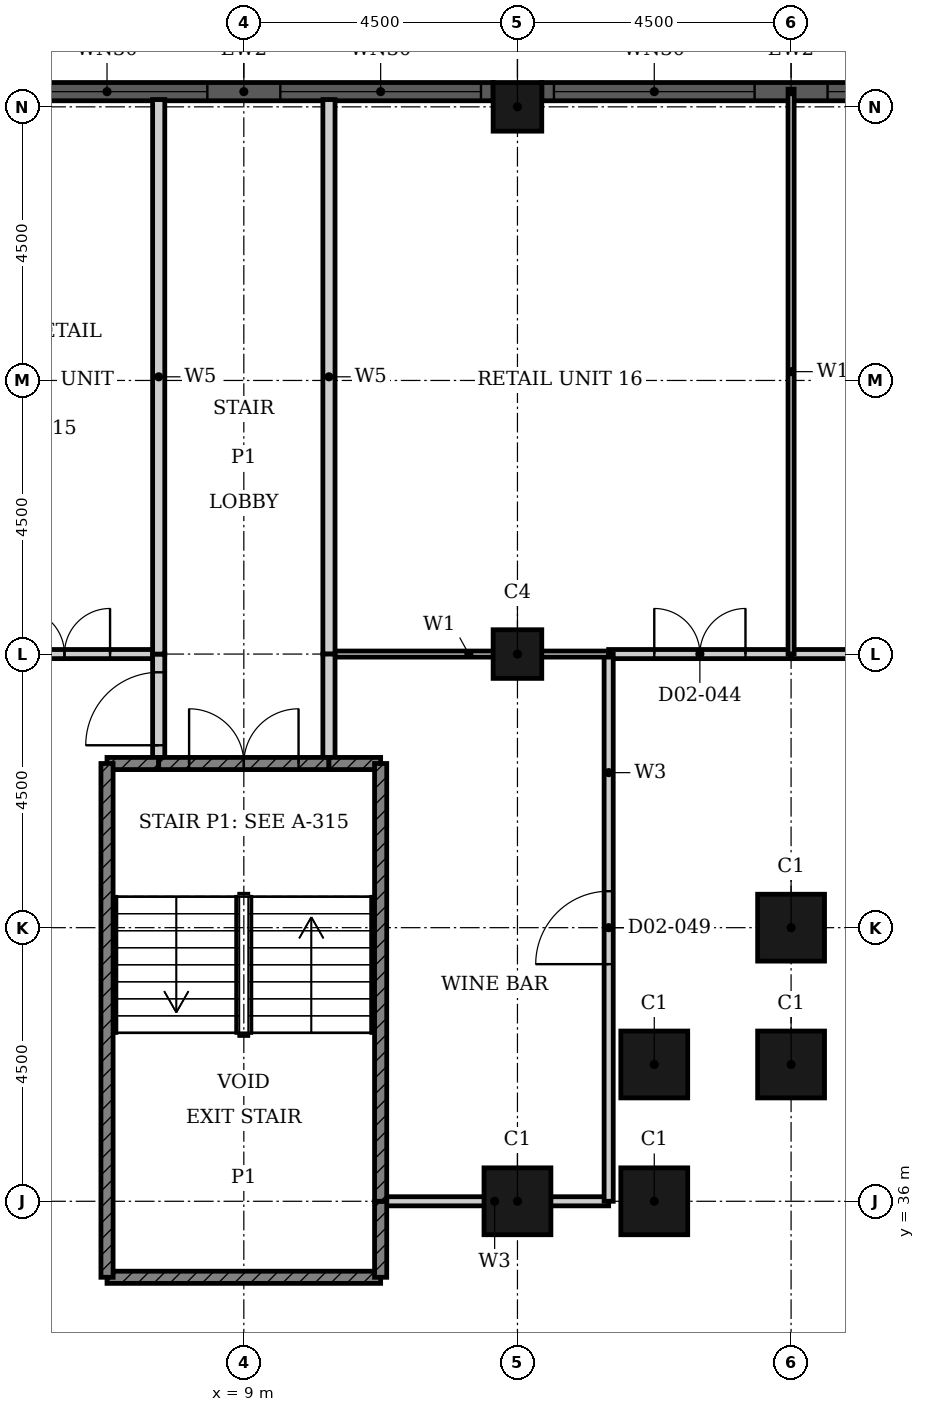
"""IFC4 building model, lengths in metres.
Left out: names, types, materials, properties, quantities, classifications, styles, units other than length and angle.
Written with IfcOpenShell. Run it as: python <this file> out.ifc"""

import sys

from ifc_helpers import new_model, si_unit, direction, frame, frame_2d, origin, origin_2d, place, context, subcontext, project, spatial, rectangle, hollow_rectangle, extrude, element, fill, save


model = new_model("IFC4")
c1 = context("Model", 3, precision=1e-05, world=origin(), true_north=direction((0.0, 1.0)))
c2 = subcontext(c1, "Body", "Model", "MODEL_VIEW")
j1 = project(units=[si_unit("LENGTHUNIT", "METRE"), si_unit("PLANEANGLEUNIT", "RADIAN")], contexts=[c1])
p1 = place(None, origin())
s1 = spatial("IfcSite", under=j1, at=p1, CompositionType="ELEMENT")
p2 = place(p1, origin())
s2 = spatial("IfcBuilding", under=s1, at=p2, CompositionType="ELEMENT")
p3 = place(p2, frame((0.0, 0.0, 12.0)))
s3 = spatial("IfcBuildingStorey", under=s2, at=p3, CompositionType="ELEMENT", Elevation=12.0)
for number, where, z_axis, x_axis in (
    (1, (18.0, 40.5, 0.0), (0.0, 0.0, 1.0), (1.0, 0.0, 0.0)),
    (2, (18.0, 38.25, 0.0), (0.0, 0.0, 1.0), (1.0, 0.0, 0.0)),
    (3, (15.75, 38.25, 0.0), (0.0, 0.0, 1.0), (1.0, 0.0, 0.0)),
    (4, (15.75, 36.0, 0.0), (0.0, 0.0, 1.0), (1.0, 0.0, 0.0)),
    (5, (13.5, 36.0, 0.0), (0.0, 0.0, 1.0), (1.0, 0.0, 0.0)),
):
    element("IfcColumn", number, at=place(p3, frame(where, z_axis=z_axis, x_axis=x_axis)), inside=s3, PredefinedType="COLUMN", context=c2, shape_type="SweptSolid", body=[
        extrude(hollow_rectangle(XDim=1.1, YDim=1.1, WallThickness=0.036, at=origin_2d()), origin(), (0.0, 0.0, 1.0), 5.4),
    ])
for number, where, z_axis, x_axis in (
    (6, (13.5, 54.0, 0.0), (0.0, 0.0, 1.0), (1.0, 0.0, 0.0)),
    (7, (13.5, 45.0, 0.0), (0.0, 0.0, 1.0), (1.0, 0.0, 0.0)),
):
    element("IfcColumn", number, at=place(p3, frame(where, z_axis=z_axis, x_axis=x_axis)), inside=s3, PredefinedType="COLUMN", context=c2, shape_type="SweptSolid", body=[
        extrude(hollow_rectangle(XDim=0.8, YDim=0.8, WallThickness=0.025, at=origin_2d()), origin(), (0.0, 0.0, 1.0), 5.4),
    ])
p4 = place(p3, frame((22.1, 54.25, 0.0), z_axis=(0.0, 0.0, 1.0), x_axis=(-1.0, 0.0, 0.0)))
e8 = element("IfcWall", 8, at=p4, inside=s3, PredefinedType="SOLIDWALL", context=c2, shape_type="SweptSolid", body=[
    extrude(rectangle(XDim=8.2, YDim=0.3, at=frame_2d((4.1, 0.0))), origin(), (0.0, 0.0, 1.0), 5.4),
])
p5 = place(p4, frame((0.2, 0.0, 0.9)))
e9 = element("IfcOpeningElement", 9, at=p5, cuts=e8, PredefinedType="OPENING", context=c2, shape_type="SweptSolid", body=[
    extrude(rectangle(XDim=3.3, YDim=3.5, at=frame_2d((1.65, 1.75))), frame((0.0, 0.16, 0.0), z_axis=(0.0, -1.0, 0.0), x_axis=(1.0, 0.0, 0.0)), (0.0, 0.0, 1.0), 0.32),
])
p6 = place(p4, frame((4.7, 0.0, 0.9)))
e10 = element("IfcOpeningElement", 10, at=p6, cuts=e8, PredefinedType="OPENING", context=c2, shape_type="SweptSolid", body=[
    extrude(rectangle(XDim=3.3, YDim=3.5, at=frame_2d((1.65, 1.75))), frame((0.0, 0.16, 0.0), z_axis=(0.0, -1.0, 0.0), x_axis=(1.0, 0.0, 0.0)), (0.0, 0.0, 1.0), 0.32),
])
p7 = place(p3, frame((13.1, 54.25, 0.0), z_axis=(0.0, 0.0, 1.0), x_axis=(-1.0, 0.0, 0.0)))
e11 = element("IfcWall", 11, at=p7, inside=s3, PredefinedType="SOLIDWALL", context=c2, shape_type="SweptSolid", body=[
    extrude(rectangle(XDim=8.2, YDim=0.3, at=frame_2d((4.1, 0.0))), origin(), (0.0, 0.0, 1.0), 5.4),
])
p8 = place(p7, frame((0.2, 0.0, 0.9)))
e12 = element("IfcOpeningElement", 12, at=p8, cuts=e11, PredefinedType="OPENING", context=c2, shape_type="SweptSolid", body=[
    extrude(rectangle(XDim=3.3, YDim=3.5, at=frame_2d((1.65, 1.75))), frame((0.0, 0.16, 0.0), z_axis=(0.0, -1.0, 0.0), x_axis=(1.0, 0.0, 0.0)), (0.0, 0.0, 1.0), 0.32),
])
p9 = place(p7, frame((4.7, 0.0, 0.9)))
e13 = element("IfcOpeningElement", 13, at=p9, cuts=e11, PredefinedType="OPENING", context=c2, shape_type="SweptSolid", body=[
    extrude(rectangle(XDim=3.3, YDim=3.5, at=frame_2d((1.65, 1.75))), frame((0.0, 0.16, 0.0), z_axis=(0.0, -1.0, 0.0), x_axis=(1.0, 0.0, 0.0)), (0.0, 0.0, 1.0), 0.32),
])
p10 = place(p3, frame((11.25, 36.0, 0.0), z_axis=(0.0, 0.0, 1.0), x_axis=(1.0, 0.0, 0.0)))
e14 = element("IfcWall", 14, at=p10, inside=s3, PredefinedType="PARTITIONING", context=c2, shape_type="SweptSolid", body=[
    extrude(rectangle(XDim=3.75, YDim=0.15, at=frame_2d((1.875, 0.0))), origin(), (0.0, 0.0, 1.0), 5.05),
])
p11 = place(p3, frame((4.5, 45.0, 0.0), z_axis=(0.0, 0.0, 1.0), x_axis=(1.0, 0.0, 0.0)))
e15 = element("IfcWall", 15, at=p11, inside=s3, PredefinedType="PARTITIONING", context=c2, shape_type="SweptSolid", body=[
    extrude(rectangle(XDim=3.1, YDim=0.15, at=frame_2d((1.55, 0.0))), origin(), (0.0, 0.0, 1.0), 5.05),
])
p12 = place(p11, frame((0.8, 0.0, 0.0)))
e16 = element("IfcOpeningElement", 16, at=p12, cuts=e15, PredefinedType="OPENING", context=c2, shape_type="SweptSolid", body=[
    extrude(rectangle(XDim=1.5, YDim=2.4, at=frame_2d((0.75, 1.2))), frame((0.0, 0.085, 0.0), z_axis=(0.0, -1.0, 0.0), x_axis=(1.0, 0.0, 0.0)), (0.0, 0.0, 1.0), 0.17),
])
p13 = place(p3, frame((15.0, 45.0, 0.0), z_axis=(0.0, 0.0, 1.0), x_axis=(1.0, 0.0, 0.0)))
e17 = element("IfcWall", 17, at=p13, inside=s3, PredefinedType="PARTITIONING", context=c2, shape_type="SweptSolid", body=[
    extrude(rectangle(XDim=3.0, YDim=0.15, at=frame_2d((1.5, 0.0))), origin(), (0.0, 0.0, 1.0), 5.05),
])
p14 = place(p13, frame((0.75, 0.0, 0.0)))
e18 = element("IfcOpeningElement", 18, at=p14, cuts=e17, PredefinedType="OPENING", context=c2, shape_type="SweptSolid", body=[
    extrude(rectangle(XDim=1.5, YDim=2.4, at=frame_2d((0.75, 1.2))), frame((0.0, 0.085, 0.0), z_axis=(0.0, -1.0, 0.0), x_axis=(1.0, 0.0, 0.0)), (0.0, 0.0, 1.0), 0.17),
])
p15 = place(p3, frame((18.0, 45.0, 0.0), z_axis=(0.0, 0.0, 1.0), x_axis=(1.0, 0.0, 0.0)))
e19 = element("IfcWall", 19, at=p15, inside=s3, PredefinedType="PARTITIONING", context=c2, shape_type="SweptSolid", body=[
    extrude(rectangle(XDim=13.5, YDim=0.15, at=frame_2d((6.75, 0.0))), origin(), (0.0, 0.0, 1.0), 5.05),
])
p16 = place(p15, frame((6.15, 0.0, 0.0)))
e20 = element("IfcOpeningElement", 20, at=p16, cuts=e19, PredefinedType="OPENING", context=c2, shape_type="SweptSolid", body=[
    extrude(rectangle(XDim=1.2, YDim=2.4, at=frame_2d((0.6, 1.2))), frame((0.0, 0.085, 0.0), z_axis=(0.0, -1.0, 0.0), x_axis=(1.0, 0.0, 0.0)), (0.0, 0.0, 1.0), 0.17),
])
p17 = place(p3, frame((15.0, 36.0, 0.0), z_axis=(0.0, 0.0, 1.0), x_axis=(0.0, 1.0, 0.0)))
e21 = element("IfcWall", 21, at=p17, inside=s3, PredefinedType="PARTITIONING", context=c2, shape_type="SweptSolid", body=[
    extrude(rectangle(XDim=9.0, YDim=0.15, at=frame_2d((4.5, 0.0))), origin(), (0.0, 0.0, 1.0), 5.05),
])
p18 = place(p17, frame((3.9, 0.0, 0.0)))
e22 = element("IfcOpeningElement", 22, at=p18, cuts=e21, PredefinedType="OPENING", context=c2, shape_type="SweptSolid", body=[
    extrude(rectangle(XDim=1.2, YDim=2.4, at=frame_2d((0.6, 1.2))), frame((0.0, 0.085, 0.0), z_axis=(0.0, -1.0, 0.0), x_axis=(1.0, 0.0, 0.0)), (0.0, 0.0, 1.0), 0.17),
])
p19 = place(p3, frame((10.4, 45.0, 0.0), z_axis=(0.0, 0.0, 1.0), x_axis=(1.0, 0.0, 0.0)))
e23 = element("IfcWall", 23, at=p19, inside=s3, PredefinedType="PARTITIONING", context=c2, shape_type="SweptSolid", body=[
    extrude(rectangle(XDim=4.6, YDim=0.1, at=frame_2d((2.3, 0.0))), origin(), (0.0, 0.0, 1.0), 5.05),
])
p20 = place(p3, frame((18.0, 45.0, 0.0), z_axis=(0.0, 0.0, 1.0), x_axis=(0.0, 1.0, 0.0)))
e24 = element("IfcWall", 24, at=p20, inside=s3, PredefinedType="PARTITIONING", context=c2, shape_type="SweptSolid", body=[
    extrude(rectangle(XDim=9.29, YDim=0.1, at=frame_2d((4.645, 0.0))), origin(), (0.0, 0.0, 1.0), 5.05),
])
p21 = place(p3, frame((10.4, 45.0, 0.0), z_axis=(0.0, 0.0, 1.0), x_axis=(0.0, 1.0, 0.0)))
e25 = element("IfcWall", 25, at=p21, inside=s3, PredefinedType="PARTITIONING", context=c2, shape_type="SweptSolid", body=[
    extrude(rectangle(XDim=9.12, YDim=0.2, at=frame_2d((4.56, 0.0))), origin(), (0.0, 0.0, 1.0), 5.05),
])
p22 = place(p3, frame((10.4, 43.2, 0.0), z_axis=(0.0, 0.0, 1.0), x_axis=(0.0, 1.0, 0.0)))
e26 = element("IfcWall", 26, at=p22, inside=s3, PredefinedType="PARTITIONING", context=c2, shape_type="SweptSolid", body=[
    extrude(rectangle(XDim=1.8, YDim=0.2, at=frame_2d((0.9, 0.0))), origin(), (0.0, 0.0, 1.0), 5.05),
])
p23 = place(p3, frame((7.6, 43.2, 0.0), z_axis=(0.0, 0.0, 1.0), x_axis=(0.0, 1.0, 0.0)))
e27 = element("IfcWall", 27, at=p23, inside=s3, PredefinedType="PARTITIONING", context=c2, shape_type="SweptSolid", body=[
    extrude(rectangle(XDim=1.8, YDim=0.2, at=frame_2d((0.9, 0.0))), origin(), (0.0, 0.0, 1.0), 5.05),
])
p24 = place(p23, frame((0.3, 0.0, 0.0)))
e28 = element("IfcOpeningElement", 28, at=p24, cuts=e27, PredefinedType="OPENING", context=c2, shape_type="SweptSolid", body=[
    extrude(rectangle(XDim=1.2, YDim=2.1, at=frame_2d((0.6, 1.05))), frame((0.0, 0.11, 0.0), z_axis=(0.0, -1.0, 0.0), x_axis=(1.0, 0.0, 0.0)), (0.0, 0.0, 1.0), 0.22),
])
p25 = place(p3, frame((7.6, 45.0, 0.0), z_axis=(0.0, 0.0, 1.0), x_axis=(0.0, 1.0, 0.0)))
e29 = element("IfcWall", 29, at=p25, inside=s3, PredefinedType="PARTITIONING", context=c2, shape_type="SweptSolid", body=[
    extrude(rectangle(XDim=9.12, YDim=0.2, at=frame_2d((4.56, 0.0))), origin(), (0.0, 0.0, 1.0), 5.05),
])
p26 = place(p3, frame((6.75, 34.75, 0.0), z_axis=(0.0, 0.0, 1.0), x_axis=(1.0, 0.0, 0.0)))
e30 = element("IfcWall", 30, at=p26, inside=s3, PredefinedType="SHEAR", context=c2, shape_type="SweptSolid", body=[
    extrude(rectangle(XDim=4.5, YDim=0.2, at=frame_2d((2.25, 0.0))), origin(), (0.0, 0.0, 1.0), 5.05),
])
p27 = place(p3, frame((6.75, 43.2, 0.0), z_axis=(0.0, 0.0, 1.0), x_axis=(1.0, 0.0, 0.0)))
e31 = element("IfcWall", 31, at=p27, inside=s3, PredefinedType="SHEAR", context=c2, shape_type="SweptSolid", body=[
    extrude(rectangle(XDim=0.85, YDim=0.2, at=frame_2d((0.425, 0.0))), origin(), (0.0, 0.0, 1.0), 5.05),
])
p28 = place(p3, frame((7.6, 43.2, 0.0), z_axis=(0.0, 0.0, 1.0), x_axis=(1.0, 0.0, 0.0)))
e32 = element("IfcWall", 32, at=p28, inside=s3, PredefinedType="SHEAR", context=c2, shape_type="SweptSolid", body=[
    extrude(rectangle(XDim=2.8, YDim=0.2, at=frame_2d((1.4, 0.0))), origin(), (0.0, 0.0, 1.0), 5.05),
])
p29 = place(p28, frame((0.5, 0.0, 0.0)))
e33 = element("IfcOpeningElement", 33, at=p29, cuts=e32, PredefinedType="OPENING", context=c2, shape_type="SweptSolid", body=[
    extrude(rectangle(XDim=1.8, YDim=2.1, at=frame_2d((0.9, 1.05))), frame((0.0, 0.11, 0.0), z_axis=(0.0, -1.0, 0.0), x_axis=(1.0, 0.0, 0.0)), (0.0, 0.0, 1.0), 0.22),
])
p30 = place(p3, frame((10.4, 43.2, 0.0), z_axis=(0.0, 0.0, 1.0), x_axis=(1.0, 0.0, 0.0)))
e34 = element("IfcWall", 34, at=p30, inside=s3, PredefinedType="SHEAR", context=c2, shape_type="SweptSolid", body=[
    extrude(rectangle(XDim=0.85, YDim=0.2, at=frame_2d((0.425, 0.0))), origin(), (0.0, 0.0, 1.0), 5.05),
])
p31 = place(p3, frame((11.25, 34.75, 0.0), z_axis=(0.0, 0.0, 1.0), x_axis=(0.0, 1.0, 0.0)))
e35 = element("IfcWall", 35, at=p31, inside=s3, PredefinedType="SHEAR", context=c2, shape_type="SweptSolid", body=[
    extrude(rectangle(XDim=1.25, YDim=0.2, at=frame_2d((0.625, 0.0))), origin(), (0.0, 0.0, 1.0), 5.05),
])
p32 = place(p3, frame((11.25, 36.0, 0.0), z_axis=(0.0, 0.0, 1.0), x_axis=(0.0, 1.0, 0.0)))
e36 = element("IfcWall", 36, at=p32, inside=s3, PredefinedType="SHEAR", context=c2, shape_type="SweptSolid", body=[
    extrude(rectangle(XDim=7.2, YDim=0.2, at=frame_2d((3.6, 0.0))), origin(), (0.0, 0.0, 1.0), 5.05),
])
p33 = place(p3, frame((6.75, 34.75, 0.0), z_axis=(0.0, 0.0, 1.0), x_axis=(0.0, 1.0, 0.0)))
e37 = element("IfcWall", 37, at=p33, inside=s3, PredefinedType="SHEAR", context=c2, shape_type="SweptSolid", body=[
    extrude(rectangle(XDim=8.45, YDim=0.2, at=frame_2d((4.225, 0.0))), origin(), (0.0, 0.0, 1.0), 5.05),
])
p34 = place(p5, origin())
e38 = element("IfcWindow", 38, at=p34, inside=s3, PartitioningType="SINGLE_PANEL", PredefinedType="WINDOW", context=c2, shape_type="SweptSolid", body=[
    extrude(rectangle(XDim=3.3, YDim=3.5, at=frame_2d((1.65, 1.75))), frame((0.0, 0.03, 0.0), z_axis=(0.0, -1.0, 0.0), x_axis=(1.0, 0.0, 0.0)), (0.0, 0.0, 1.0), 0.06),
])
fill(e9, e38)
p35 = place(p6, origin())
e39 = element("IfcWindow", 39, at=p35, inside=s3, PartitioningType="SINGLE_PANEL", PredefinedType="WINDOW", context=c2, shape_type="SweptSolid", body=[
    extrude(rectangle(XDim=3.3, YDim=3.5, at=frame_2d((1.65, 1.75))), frame((0.0, 0.03, 0.0), z_axis=(0.0, -1.0, 0.0), x_axis=(1.0, 0.0, 0.0)), (0.0, 0.0, 1.0), 0.06),
])
fill(e10, e39)
p36 = place(p8, origin())
e40 = element("IfcWindow", 40, at=p36, inside=s3, PartitioningType="SINGLE_PANEL", PredefinedType="WINDOW", context=c2, shape_type="SweptSolid", body=[
    extrude(rectangle(XDim=3.3, YDim=3.5, at=frame_2d((1.65, 1.75))), frame((0.0, 0.03, 0.0), z_axis=(0.0, -1.0, 0.0), x_axis=(1.0, 0.0, 0.0)), (0.0, 0.0, 1.0), 0.06),
])
fill(e12, e40)
p37 = place(p9, origin())
e41 = element("IfcWindow", 41, at=p37, inside=s3, PartitioningType="SINGLE_PANEL", PredefinedType="WINDOW", context=c2, shape_type="SweptSolid", body=[
    extrude(rectangle(XDim=3.3, YDim=3.5, at=frame_2d((1.65, 1.75))), frame((0.0, 0.03, 0.0), z_axis=(0.0, -1.0, 0.0), x_axis=(1.0, 0.0, 0.0)), (0.0, 0.0, 1.0), 0.06),
])
fill(e13, e41)
p38 = place(p24, origin())
e42 = element("IfcDoor", 42, at=p38, inside=s3, OperationType="SINGLE_SWING_LEFT", PredefinedType="DOOR", context=c2, shape_type="SweptSolid", body=[
    extrude(rectangle(XDim=1.2, YDim=2.1, at=frame_2d((0.6, 1.05))), frame((0.0, 0.025, 0.0), z_axis=(0.0, -1.0, 0.0), x_axis=(1.0, 0.0, 0.0)), (0.0, 0.0, 1.0), 0.05),
])
fill(e28, e42)
p39 = place(p29, origin())
e43 = element("IfcDoor", 43, at=p39, inside=s3, OperationType="DOUBLE_DOOR_SINGLE_SWING", PredefinedType="DOOR", context=c2, shape_type="SweptSolid", body=[
    extrude(rectangle(XDim=1.8, YDim=2.1, at=frame_2d((0.9, 1.05))), frame((0.0, 0.025, 0.0), z_axis=(0.0, -1.0, 0.0), x_axis=(1.0, 0.0, 0.0)), (0.0, 0.0, 1.0), 0.05),
])
fill(e33, e43)
p40 = place(p12, origin())
e44 = element("IfcDoor", 44, at=p40, inside=s3, OperationType="DOUBLE_DOOR_SINGLE_SWING", PredefinedType="DOOR", context=c2, shape_type="SweptSolid", body=[
    extrude(rectangle(XDim=1.5, YDim=2.4, at=frame_2d((0.75, 1.2))), frame((0.0, 0.025, 0.0), z_axis=(0.0, -1.0, 0.0), x_axis=(1.0, 0.0, 0.0)), (0.0, 0.0, 1.0), 0.05),
])
fill(e16, e44)
p41 = place(p14, origin())
e45 = element("IfcDoor", 45, at=p41, inside=s3, OperationType="DOUBLE_DOOR_SINGLE_SWING", PredefinedType="DOOR", context=c2, shape_type="SweptSolid", body=[
    extrude(rectangle(XDim=1.5, YDim=2.4, at=frame_2d((0.75, 1.2))), frame((0.0, 0.025, 0.0), z_axis=(0.0, -1.0, 0.0), x_axis=(1.0, 0.0, 0.0)), (0.0, 0.0, 1.0), 0.05),
])
fill(e18, e45)
p42 = place(p18, origin())
e46 = element("IfcDoor", 46, at=p42, inside=s3, OperationType="SINGLE_SWING_RIGHT", PredefinedType="DOOR", context=c2, shape_type="SweptSolid", body=[
    extrude(rectangle(XDim=1.2, YDim=2.4, at=frame_2d((0.6, 1.2))), frame((0.0, 0.025, 0.0), z_axis=(0.0, -1.0, 0.0), x_axis=(1.0, 0.0, 0.0)), (0.0, 0.0, 1.0), 0.05),
])
fill(e22, e46)
save(model, sys.argv[1])
